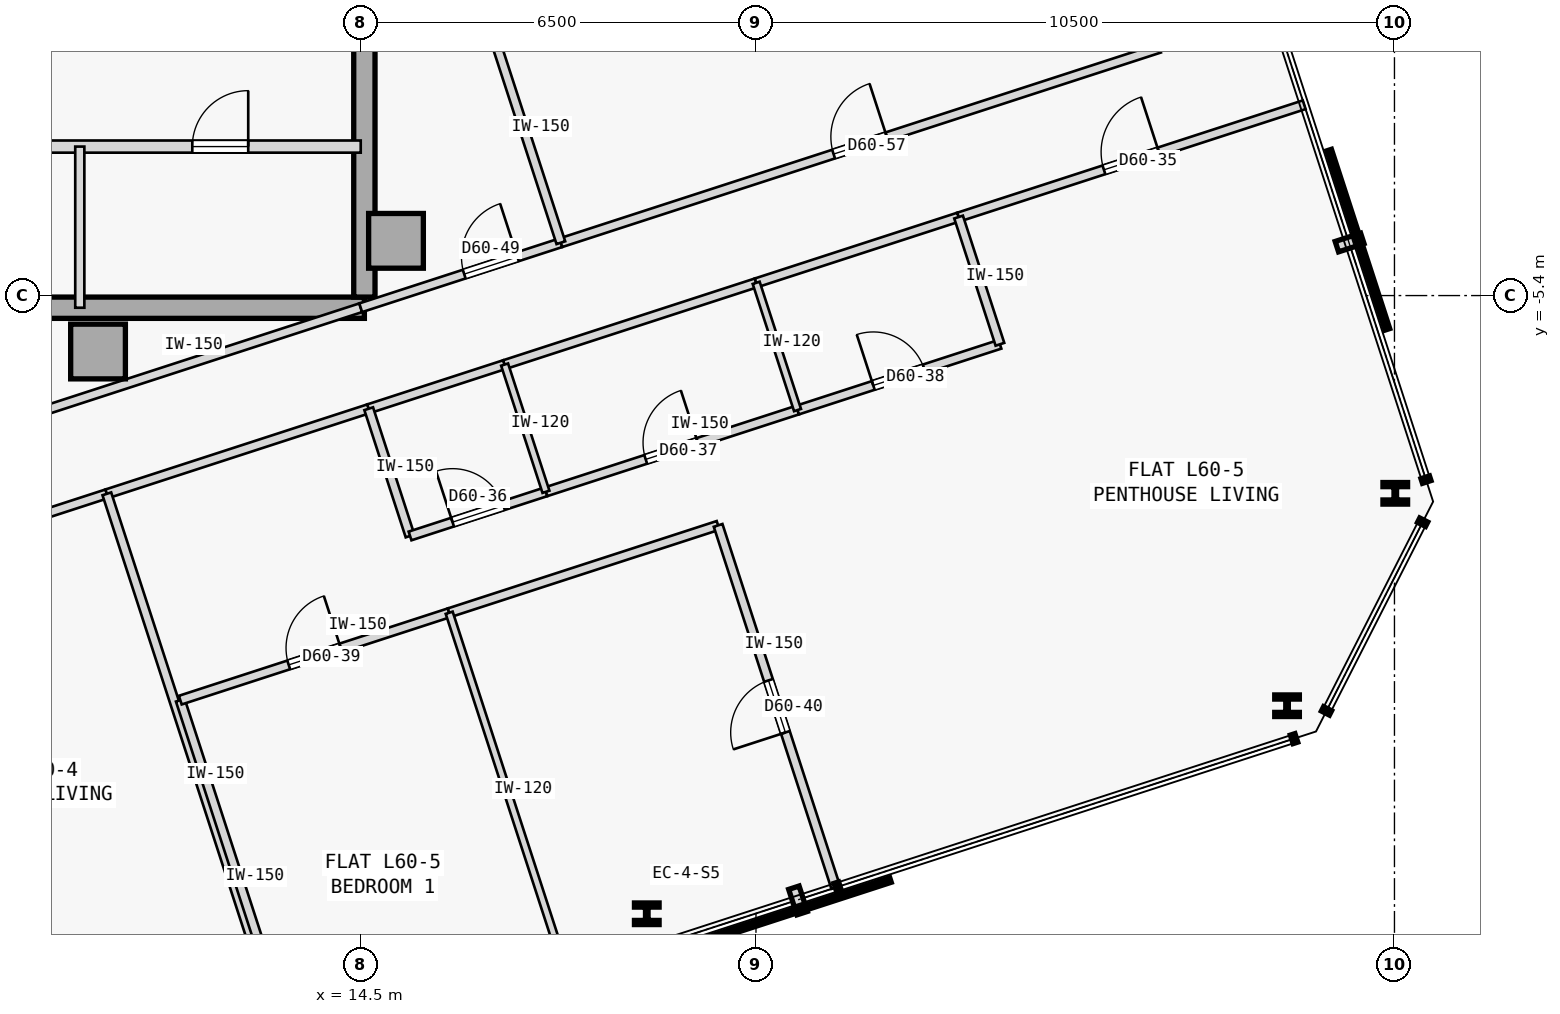
"""IFC4 building model, lengths in metres.
Left out: names, types, materials, properties, quantities, classifications, styles, units other than length and angle.
Written with IfcOpenShell. Run it as: python <this file> out.ifc"""

import sys

from ifc_helpers import new_model, si_unit, direction, frame, frame_2d, origin, origin_2d, place, context, subcontext, project, spatial, rectangle, i_section, extrude, element, fill, save


model = new_model("IFC4")
c1 = context("Model", 3, precision=1e-05, world=origin(), true_north=direction((0.0, 1.0)))
c2 = subcontext(c1, "Body", "Model", "MODEL_VIEW")
j1 = project(units=[si_unit("LENGTHUNIT", "METRE"), si_unit("PLANEANGLEUNIT", "RADIAN")], contexts=[c1])
p1 = place(None, origin())
s1 = spatial("IfcSite", under=j1, at=p1, CompositionType="ELEMENT")
p2 = place(p1, origin())
s2 = spatial("IfcBuilding", under=s1, at=p2, CompositionType="ELEMENT")
p3 = place(p2, frame((0.0, 0.0, 227.65)))
s3 = spatial("IfcBuildingStorey", under=s2, at=p3, CompositionType="ELEMENT", Elevation=227.65)
for number, where, z_axis, x_axis in (
    (1, (15.08, -4.5, 0.0), (0.0, 0.0, 1.0), (1.0, 0.0, 0.0)),
    (2, (10.18, -6.32, 0.0), (0.0, 0.0, 1.0), (1.0, 0.0, 0.0)),
):
    element("IfcColumn", number, at=place(p3, frame(where, z_axis=z_axis, x_axis=x_axis)), inside=s3, PredefinedType="COLUMN", context=c2, shape_type="SweptSolid", body=[
        extrude(rectangle(XDim=0.9, YDim=0.9, at=origin_2d()), origin(), (0.0, 0.0, 1.0), 3.35),
    ])
p4 = place(p3, frame((3.7, -5.6, 0.0), z_axis=(0.0, 0.0, 1.0), x_axis=(1.0, 0.0, 0.0)))
e3 = element("IfcWall", 3, at=p4, inside=s3, PredefinedType="SHEAR", context=c2, shape_type="SweptSolid", body=[
    extrude(rectangle(XDim=10.86, YDim=0.35, at=frame_2d((5.43, 0.0))), origin(), (0.0, 0.0, 1.0), 3.125),
])
p5 = place(p3, frame((14.56, -5.425, 0.0), z_axis=(0.0, 0.0, 1.0), x_axis=(0.0, 1.0, 0.0)))
e4 = element("IfcWall", 4, at=p5, inside=s3, PredefinedType="SHEAR", context=c2, shape_type="SweptSolid", body=[
    extrude(rectangle(XDim=10.85, YDim=0.35, at=frame_2d((5.425, 0.0))), origin(), (0.0, 0.0, 1.0), 3.125),
])
for number, where, z_axis, x_axis in (
    (5, (19.204, -15.566, 0.0), (0.0, 0.0, 1.0), (1.0, 0.0, 0.0)),
    (6, (29.734, -12.145, 0.0), (0.0, 0.0, 1.0), (1.0, 0.0, 0.0)),
    (7, (31.513, -8.652, 0.0), (0.0, 0.0, 1.0), (1.0, 0.0, 0.0)),
):
    element("IfcColumn", number, at=place(p3, frame(where, z_axis=z_axis, x_axis=x_axis)), inside=s3, PredefinedType="COLUMN", context=c2, shape_type="SweptSolid", body=[
        extrude(i_section(OverallWidth=0.405, OverallDepth=0.355, WebThickness=0.042, FlangeThickness=0.068, FilletRadius=0.015, at=origin_2d()), origin(), (0.0, 0.0, 1.0), 3.35),
    ])
p6 = place(p3, frame((3.7, -2.95, 0.0), z_axis=(0.0, 0.0, 1.0), x_axis=(1.0, 0.0, 0.0)))
e8 = element("IfcWall", 8, at=p6, inside=s3, PredefinedType="STANDARD", context=c2, shape_type="SweptSolid", body=[
    extrude(rectangle(XDim=10.8, YDim=0.2, at=frame_2d((5.4, 0.0))), origin(), (0.0, 0.0, 1.0), 3.125),
])
p7 = place(p6, frame((0.53, 0.0, 0.0)))
e9 = element("IfcOpeningElement", 9, at=p7, cuts=e8, PredefinedType="OPENING", context=c2, shape_type="SweptSolid", body=[
    extrude(rectangle(XDim=1.1, YDim=2.15, at=frame_2d((0.55, 1.075))), frame((0.0, 0.11, 0.0), z_axis=(0.0, -1.0, 0.0), x_axis=(1.0, 0.0, 0.0)), (0.0, 0.0, 1.0), 0.22),
])
p8 = place(p6, frame((3.71, 0.0, 0.0)))
e10 = element("IfcOpeningElement", 10, at=p8, cuts=e8, PredefinedType="OPENING", context=c2, shape_type="SweptSolid", body=[
    extrude(rectangle(XDim=0.92, YDim=2.15, at=frame_2d((0.46, 1.075))), frame((0.0, 0.11, 0.0), z_axis=(0.0, -1.0, 0.0), x_axis=(1.0, 0.0, 0.0)), (0.0, 0.0, 1.0), 0.22),
])
p9 = place(p6, frame((8.03, 0.0, 0.0)))
e11 = element("IfcOpeningElement", 11, at=p9, cuts=e8, PredefinedType="OPENING", context=c2, shape_type="SweptSolid", body=[
    extrude(rectangle(XDim=0.92, YDim=2.15, at=frame_2d((0.46, 1.075))), frame((0.0, 0.11, 0.0), z_axis=(0.0, -1.0, 0.0), x_axis=(1.0, 0.0, 0.0)), (0.0, 0.0, 1.0), 0.22),
])
p10 = place(p3, frame((9.88, -5.6, 0.0), z_axis=(0.0, 0.0, 1.0), x_axis=(0.0, 1.0, 0.0)))
e12 = element("IfcWall", 12, at=p10, inside=s3, PredefinedType="PARTITIONING", context=c2, shape_type="SweptSolid", body=[
    extrude(rectangle(XDim=2.65, YDim=0.15, at=frame_2d((1.325, 0.0))), origin(), (0.0, 0.0, 1.0), 3.125),
])
p11 = place(p3, frame((5.174, -10.334, 0.0), z_axis=(0.0, 0.0, 1.0), x_axis=(0.951058579685, 0.30901064384, 0.0)))
e13 = element("IfcWall", 13, at=p11, inside=s3, PredefinedType="PARTITIONING", context=c2, shape_type="SweptSolid", body=[
    extrude(rectangle(XDim=5.416, YDim=0.15, at=frame_2d((2.708, 0.0))), origin(), (0.0, 0.0, 1.0), 3.125),
])
p12 = place(p11, frame((2.233, 0.0, 0.0)))
e14 = element("IfcOpeningElement", 14, at=p12, cuts=e13, PredefinedType="OPENING", context=c2, shape_type="SweptSolid", body=[
    extrude(rectangle(XDim=0.95, YDim=2.15, at=frame_2d((0.475, 1.075))), frame((0.0, 0.085, 0.0), z_axis=(0.0, -1.0, 0.0), x_axis=(1.0, 0.0, 0.0)), (0.0, 0.0, 1.0), 0.17),
])
p13 = place(p3, frame((10.325, -8.66, 0.0), z_axis=(0.0, 0.0, 1.0), x_axis=(0.95106061278, 0.309004386407, 0.0)))
e15 = element("IfcWall", 15, at=p13, inside=s3, PredefinedType="PARTITIONING", context=c2, shape_type="SweptSolid", body=[
    extrude(rectangle(XDim=4.528, YDim=0.15, at=frame_2d((2.264, 0.0))), origin(), (0.0, 0.0, 1.0), 3.125),
])
p14 = place(p3, frame((24.332, -4.109, 0.0), z_axis=(0.0, 0.0, 1.0), x_axis=(0.951058083458, 0.309012171103, 0.0)))
e16 = element("IfcWall", 16, at=p14, inside=s3, PredefinedType="PARTITIONING", context=c2, shape_type="SweptSolid", body=[
    extrude(rectangle(XDim=5.976, YDim=0.15, at=frame_2d((2.988, 0.0))), origin(), (0.0, 0.0, 1.0), 3.125),
])
p15 = place(p14, frame((2.513, 0.0, 0.0)))
e17 = element("IfcOpeningElement", 17, at=p15, cuts=e16, PredefinedType="OPENING", context=c2, shape_type="SweptSolid", body=[
    extrude(rectangle(XDim=0.95, YDim=2.15, at=frame_2d((0.475, 1.075))), frame((0.0, 0.085, 0.0), z_axis=(0.0, -1.0, 0.0), x_axis=(1.0, 0.0, 0.0)), (0.0, 0.0, 1.0), 0.17),
])
p16 = place(p3, frame((14.631, -7.261, 0.0), z_axis=(0.0, 0.0, 1.0), x_axis=(0.951066131077, 0.308987401554, 0.0)))
e18 = element("IfcWall", 18, at=p16, inside=s3, PredefinedType="PARTITIONING", context=c2, shape_type="SweptSolid", body=[
    extrude(rectangle(XDim=2.35, YDim=0.15, at=frame_2d((1.175, 0.0))), origin(), (0.0, 0.0, 1.0), 3.125),
])
p17 = place(p3, frame((16.866, -6.535, 0.0), z_axis=(0.0, 0.0, 1.0), x_axis=(0.951041492154, 0.309063230101, 0.0)))
e19 = element("IfcWall", 19, at=p17, inside=s3, PredefinedType="PARTITIONING", context=c2, shape_type="SweptSolid", body=[
    extrude(rectangle(XDim=4.35, YDim=0.15, at=frame_2d((2.175, 0.0))), origin(), (0.0, 0.0, 1.0), 3.125),
])
p18 = place(p3, frame((21.003, -5.19, 0.0), z_axis=(0.0, 0.0, 1.0), x_axis=(0.951055596592, 0.309019824916, 0.0)))
e20 = element("IfcWall", 20, at=p18, inside=s3, PredefinedType="PARTITIONING", context=c2, shape_type="SweptSolid", body=[
    extrude(rectangle(XDim=3.5, YDim=0.15, at=frame_2d((1.75, 0.0))), origin(), (0.0, 0.0, 1.0), 3.125),
])
p19 = place(p3, frame((7.588, -7.846, 0.0), z_axis=(0.0, 0.0, 1.0), x_axis=(0.951058013903, 0.309012385174, 0.0)))
e21 = element("IfcWall", 21, at=p19, inside=s3, PredefinedType="PARTITIONING", context=c2, shape_type="SweptSolid", body=[
    extrude(rectangle(XDim=7.267, YDim=0.15, at=frame_2d((3.634, 0.0))), origin(), (0.0, 0.0, 1.0), 3.125),
])
p20 = place(p19, frame((0.557, 0.0, 0.0)))
e22 = element("IfcOpeningElement", 22, at=p20, cuts=e21, PredefinedType="OPENING", context=c2, shape_type="SweptSolid", body=[
    extrude(rectangle(XDim=0.92, YDim=2.15, at=frame_2d((0.46, 1.075))), frame((0.0, 0.085, 0.0), z_axis=(0.0, -1.0, 0.0), x_axis=(1.0, 0.0, 0.0)), (0.0, 0.0, 1.0), 0.17),
])
p21 = place(p3, frame((14.5, -5.6, 0.0), z_axis=(0.0, 0.0, 1.0), x_axis=(0.951047546178, 0.309044600193, 0.0)))
e23 = element("IfcWall", 23, at=p21, inside=s3, PredefinedType="PARTITIONING", context=c2, shape_type="SweptSolid", body=[
    extrude(rectangle(XDim=3.461, YDim=0.15, at=frame_2d((1.73, 0.0))), origin(), (0.0, 0.0, 1.0), 3.125),
])
p22 = place(p21, frame((1.79, 0.0, 0.0)))
e24 = element("IfcOpeningElement", 24, at=p22, cuts=e23, PredefinedType="OPENING", context=c2, shape_type="SweptSolid", body=[
    extrude(rectangle(XDim=0.92, YDim=2.15, at=frame_2d((0.46, 1.075))), frame((0.0, 0.085, 0.0), z_axis=(0.0, -1.0, 0.0), x_axis=(1.0, 0.0, 0.0)), (0.0, 0.0, 1.0), 0.17),
])
p23 = place(p3, frame((17.791, -4.531, 0.0), z_axis=(0.0, 0.0, 1.0), x_axis=(0.951056769902, 0.309016213852, 0.0)))
e25 = element("IfcWall", 25, at=p23, inside=s3, PredefinedType="PARTITIONING", context=c2, shape_type="SweptSolid", body=[
    extrude(rectangle(XDim=10.352, YDim=0.15, at=frame_2d((5.176, 0.0))), origin(), (0.0, 0.0, 1.0), 3.125),
])
p24 = place(p23, frame((4.716, 0.0, 0.0)))
e26 = element("IfcOpeningElement", 26, at=p24, cuts=e25, PredefinedType="OPENING", context=c2, shape_type="SweptSolid", body=[
    extrude(rectangle(XDim=0.92, YDim=2.15, at=frame_2d((0.46, 1.075))), frame((0.0, 0.085, 0.0), z_axis=(0.0, -1.0, 0.0), x_axis=(1.0, 0.0, 0.0)), (0.0, 0.0, 1.0), 0.17),
])
p25 = place(p3, frame((13.372, -18.04, 0.0), z_axis=(0.0, 0.0, 1.0), x_axis=(-0.308999867152, 0.951062081097, 0.0)))
e27 = element("IfcWall", 27, at=p25, inside=s3, PredefinedType="PARTITIONING", context=c2, shape_type="SweptSolid", body=[
    extrude(rectangle(XDim=9.862, YDim=0.15, at=frame_2d((4.931, 0.0))), origin(), (0.0, 0.0, 1.0), 3.125),
])
p26 = place(p3, frame((15.311, -9.353, 0.0), z_axis=(0.0, 0.0, 1.0), x_axis=(-0.308960600764, 0.951074837842, 0.0)))
e28 = element("IfcWall", 28, at=p26, inside=s3, PredefinedType="PARTITIONING", context=c2, shape_type="SweptSolid", body=[
    extrude(rectangle(XDim=2.2, YDim=0.15, at=frame_2d((1.1, 0.0))), origin(), (0.0, 0.0, 1.0), 3.125),
])
p27 = place(p3, frame((15.311, -9.353, 0.0), z_axis=(0.0, 0.0, 1.0), x_axis=(0.951076048914, 0.308956872689, 0.0)))
e29 = element("IfcWall", 29, at=p27, inside=s3, PredefinedType="PARTITIONING", context=c2, shape_type="SweptSolid", body=[
    extrude(rectangle(XDim=2.35, YDim=0.15, at=frame_2d((1.175, 0.0))), origin(), (0.0, 0.0, 1.0), 3.125),
])
p28 = place(p27, frame((0.735, 0.0, 0.0)))
e30 = element("IfcOpeningElement", 30, at=p28, cuts=e29, PredefinedType="OPENING", context=c2, shape_type="SweptSolid", body=[
    extrude(rectangle(XDim=0.88, YDim=2.15, at=frame_2d((0.44, 1.075))), frame((0.0, 0.085, 0.0), z_axis=(0.0, -1.0, 0.0), x_axis=(1.0, 0.0, 0.0)), (0.0, 0.0, 1.0), 0.17),
])
p29 = place(p3, frame((17.546, -8.627, 0.0), z_axis=(0.0, 0.0, 1.0), x_axis=(0.951052627573, 0.309028962374, 0.0)))
e31 = element("IfcWall", 31, at=p29, inside=s3, PredefinedType="PARTITIONING", context=c2, shape_type="SweptSolid", body=[
    extrude(rectangle(XDim=4.35, YDim=0.15, at=frame_2d((2.175, 0.0))), origin(), (0.0, 0.0, 1.0), 3.125),
])
p30 = place(p29, frame((1.725, 0.0, 0.0)))
e32 = element("IfcOpeningElement", 32, at=p30, cuts=e31, PredefinedType="OPENING", context=c2, shape_type="SweptSolid", body=[
    extrude(rectangle(XDim=0.9, YDim=2.15, at=frame_2d((0.45, 1.075))), frame((0.0, 0.085, 0.0), z_axis=(0.0, -1.0, 0.0), x_axis=(1.0, 0.0, 0.0)), (0.0, 0.0, 1.0), 0.17),
])
p31 = place(p3, frame((21.683, -7.283, 0.0), z_axis=(0.0, 0.0, 1.0), x_axis=(0.951062257173, 0.308999325213, 0.0)))
e33 = element("IfcWall", 33, at=p31, inside=s3, PredefinedType="PARTITIONING", context=c2, shape_type="SweptSolid", body=[
    extrude(rectangle(XDim=3.5, YDim=0.15, at=frame_2d((1.75, 0.0))), origin(), (0.0, 0.0, 1.0), 3.125),
])
p32 = place(p31, frame((1.31, 0.0, 0.0)))
e34 = element("IfcOpeningElement", 34, at=p32, cuts=e33, PredefinedType="OPENING", context=c2, shape_type="SweptSolid", body=[
    extrude(rectangle(XDim=0.88, YDim=2.15, at=frame_2d((0.44, 1.075))), frame((0.0, 0.085, 0.0), z_axis=(0.0, -1.0, 0.0), x_axis=(1.0, 0.0, 0.0)), (0.0, 0.0, 1.0), 0.17),
])
p33 = place(p3, frame((25.012, -6.201, 0.0), z_axis=(0.0, 0.0, 1.0), x_axis=(-0.309028364152, 0.951052821956, 0.0)))
e35 = element("IfcWall", 35, at=p33, inside=s3, PredefinedType="PARTITIONING", context=c2, shape_type="SweptSolid", body=[
    extrude(rectangle(XDim=2.2, YDim=0.15, at=frame_2d((1.1, 0.0))), origin(), (0.0, 0.0, 1.0), 3.125),
])
p34 = place(p3, frame((13.468, -18.009, 0.0), z_axis=(0.0, 0.0, 1.0), x_axis=(-0.309013782848, 0.951057559777, 0.0)))
e36 = element("IfcWall", 36, at=p34, inside=s3, PredefinedType="PARTITIONING", context=c2, shape_type="SweptSolid", body=[
    extrude(rectangle(XDim=6.262, YDim=0.15, at=frame_2d((3.131, 0.0))), origin(), (0.0, 0.0, 1.0), 3.125),
])
p35 = place(p3, frame((11.532, -12.053, 0.0), z_axis=(0.0, 0.0, 1.0), x_axis=(0.951065702951, 0.308988719326, 0.0)))
e37 = element("IfcWall", 37, at=p35, inside=s3, PredefinedType="PARTITIONING", context=c2, shape_type="SweptSolid", body=[
    extrude(rectangle(XDim=4.65, YDim=0.15, at=frame_2d((2.325, 0.0))), origin(), (0.0, 0.0, 1.0), 3.125),
])
p36 = place(p35, frame((1.875, 0.0, 0.0)))
e38 = element("IfcOpeningElement", 38, at=p36, cuts=e37, PredefinedType="OPENING", context=c2, shape_type="SweptSolid", body=[
    extrude(rectangle(XDim=0.9, YDim=2.15, at=frame_2d((0.45, 1.075))), frame((0.0, 0.085, 0.0), z_axis=(0.0, -1.0, 0.0), x_axis=(1.0, 0.0, 0.0)), (0.0, 0.0, 1.0), 0.17),
])
p37 = place(p3, frame((15.955, -10.616, 0.0), z_axis=(0.0, 0.0, 1.0), x_axis=(0.951050272606, 0.309036209813, 0.0)))
e39 = element("IfcWall", 39, at=p37, inside=s3, PredefinedType="PARTITIONING", context=c2, shape_type="SweptSolid", body=[
    extrude(rectangle(XDim=4.65, YDim=0.15, at=frame_2d((2.325, 0.0))), origin(), (0.0, 0.0, 1.0), 3.125),
])
p38 = place(p3, frame((22.312, -15.135, 0.0), z_axis=(0.0, 0.0, 1.0), x_axis=(-0.309013782848, 0.951057559777, 0.0)))
e40 = element("IfcWall", 40, at=p38, inside=s3, PredefinedType="PARTITIONING", context=c2, shape_type="SweptSolid", body=[
    extrude(rectangle(XDim=6.262, YDim=0.15, at=frame_2d((3.131, 0.0))), origin(), (0.0, 0.0, 1.0), 3.125),
])
p39 = place(p38, frame((2.681, 0.0, 0.0)))
e41 = element("IfcOpeningElement", 41, at=p39, cuts=e40, PredefinedType="OPENING", context=c2, shape_type="SweptSolid", body=[
    extrude(rectangle(XDim=0.9, YDim=2.15, at=frame_2d((0.45, 1.075))), frame((0.0, 0.085, 0.0), z_axis=(0.0, -1.0, 0.0), x_axis=(1.0, 0.0, 0.0)), (0.0, 0.0, 1.0), 0.17),
])
p40 = place(p3, frame((17.546, -8.627, 0.0), z_axis=(0.0, 0.0, 1.0), x_axis=(-0.309060979314, 0.951042223598, 0.0)))
e42 = element("IfcWall", 42, at=p40, inside=s3, PredefinedType="PARTITIONING", context=c2, shape_type="SweptSolid", body=[
    extrude(rectangle(XDim=2.2, YDim=0.12, at=frame_2d((1.1, 0.0))), origin(), (0.0, 0.0, 1.0), 3.125),
])
p41 = place(p3, frame((21.683, -7.283, 0.0), z_axis=(0.0, 0.0, 1.0), x_axis=(-0.30892799396, 0.951085429679, 0.0)))
e43 = element("IfcWall", 43, at=p41, inside=s3, PredefinedType="PARTITIONING", context=c2, shape_type="SweptSolid", body=[
    extrude(rectangle(XDim=2.2, YDim=0.12, at=frame_2d((1.1, 0.0))), origin(), (0.0, 0.0, 1.0), 3.125),
])
p42 = place(p3, frame((17.89, -16.572, 0.0), z_axis=(0.0, 0.0, 1.0), x_axis=(-0.309013782848, 0.951057559777, 0.0)))
e44 = element("IfcWall", 44, at=p42, inside=s3, PredefinedType="PARTITIONING", context=c2, shape_type="SweptSolid", body=[
    extrude(rectangle(XDim=6.262, YDim=0.12, at=frame_2d((3.131, 0.0))), origin(), (0.0, 0.0, 1.0), 3.125),
])
p43 = place(p3, frame((17.791, -4.531, 0.0), z_axis=(0.0, 0.0, 1.0), x_axis=(-0.309018414265, 0.951056054944, 0.0)))
e45 = element("IfcWall", 45, at=p43, inside=s3, PredefinedType="PARTITIONING", context=c2, shape_type="SweptSolid", body=[
    extrude(rectangle(XDim=3.835, YDim=0.15, at=frame_2d((1.917, 0.0))), origin(), (0.0, 0.0, 1.0), 3.125),
])
p44 = place(p9, origin())
e46 = element("IfcDoor", 46, at=p44, inside=s3, OperationType="SINGLE_SWING_RIGHT", PredefinedType="DOOR", context=c2, shape_type="SweptSolid", body=[
    extrude(rectangle(XDim=0.92, YDim=2.15, at=frame_2d((0.46, 1.075))), frame((0.0, 0.025, 0.0), z_axis=(0.0, -1.0, 0.0), x_axis=(1.0, 0.0, 0.0)), (0.0, 0.0, 1.0), 0.05),
])
fill(e11, e46)
p45 = place(p15, origin())
e47 = element("IfcDoor", 47, at=p45, inside=s3, OperationType="SINGLE_SWING_RIGHT", PredefinedType="DOOR", context=c2, shape_type="SweptSolid", body=[
    extrude(rectangle(XDim=0.95, YDim=2.15, at=frame_2d((0.475, 1.075))), frame((0.0, 0.025, 0.0), z_axis=(0.0, -1.0, 0.0), x_axis=(1.0, 0.0, 0.0)), (0.0, 0.0, 1.0), 0.05),
])
fill(e17, e47)
p46 = place(p28, origin())
e48 = element("IfcDoor", 48, at=p46, inside=s3, OperationType="SINGLE_SWING_LEFT", PredefinedType="DOOR", context=c2, shape_type="SweptSolid", body=[
    extrude(rectangle(XDim=0.88, YDim=2.15, at=frame_2d((0.44, 1.075))), frame((0.0, 0.025, 0.0), z_axis=(0.0, -1.0, 0.0), x_axis=(1.0, 0.0, 0.0)), (0.0, 0.0, 1.0), 0.05),
])
fill(e30, e48)
p47 = place(p30, origin())
e49 = element("IfcDoor", 49, at=p47, inside=s3, OperationType="SINGLE_SWING_RIGHT", PredefinedType="DOOR", context=c2, shape_type="SweptSolid", body=[
    extrude(rectangle(XDim=0.9, YDim=2.15, at=frame_2d((0.45, 1.075))), frame((0.0, 0.025, 0.0), z_axis=(0.0, -1.0, 0.0), x_axis=(1.0, 0.0, 0.0)), (0.0, 0.0, 1.0), 0.05),
])
fill(e32, e49)
p48 = place(p32, origin())
e50 = element("IfcDoor", 50, at=p48, inside=s3, OperationType="SINGLE_SWING_LEFT", PredefinedType="DOOR", context=c2, shape_type="SweptSolid", body=[
    extrude(rectangle(XDim=0.88, YDim=2.15, at=frame_2d((0.44, 1.075))), frame((0.0, 0.025, 0.0), z_axis=(0.0, -1.0, 0.0), x_axis=(1.0, 0.0, 0.0)), (0.0, 0.0, 1.0), 0.05),
])
fill(e34, e50)
p49 = place(p36, origin())
e51 = element("IfcDoor", 51, at=p49, inside=s3, OperationType="SINGLE_SWING_RIGHT", PredefinedType="DOOR", context=c2, shape_type="SweptSolid", body=[
    extrude(rectangle(XDim=0.9, YDim=2.15, at=frame_2d((0.45, 1.075))), frame((0.0, 0.025, 0.0), z_axis=(0.0, -1.0, 0.0), x_axis=(1.0, 0.0, 0.0)), (0.0, 0.0, 1.0), 0.05),
])
fill(e38, e51)
p50 = place(p39, origin())
e52 = element("IfcDoor", 52, at=p50, inside=s3, OperationType="SINGLE_SWING_LEFT", PredefinedType="DOOR", context=c2, shape_type="SweptSolid", body=[
    extrude(rectangle(XDim=0.9, YDim=2.15, at=frame_2d((0.45, 1.075))), frame((0.0, 0.025, 0.0), z_axis=(0.0, -1.0, 0.0), x_axis=(1.0, 0.0, 0.0)), (0.0, 0.0, 1.0), 0.05),
])
fill(e41, e52)
p51 = place(p22, origin())
e53 = element("IfcDoor", 53, at=p51, inside=s3, OperationType="SINGLE_SWING_RIGHT", PredefinedType="DOOR", context=c2, shape_type="SweptSolid", body=[
    extrude(rectangle(XDim=0.92, YDim=2.15, at=frame_2d((0.46, 1.075))), frame((0.0, 0.025, 0.0), z_axis=(0.0, -1.0, 0.0), x_axis=(1.0, 0.0, 0.0)), (0.0, 0.0, 1.0), 0.05),
])
fill(e24, e53)
p52 = place(p24, origin())
e54 = element("IfcDoor", 54, at=p52, inside=s3, OperationType="SINGLE_SWING_RIGHT", PredefinedType="DOOR", context=c2, shape_type="SweptSolid", body=[
    extrude(rectangle(XDim=0.92, YDim=2.15, at=frame_2d((0.46, 1.075))), frame((0.0, 0.025, 0.0), z_axis=(0.0, -1.0, 0.0), x_axis=(1.0, 0.0, 0.0)), (0.0, 0.0, 1.0), 0.05),
])
fill(e26, e54)
save(model, sys.argv[1])
